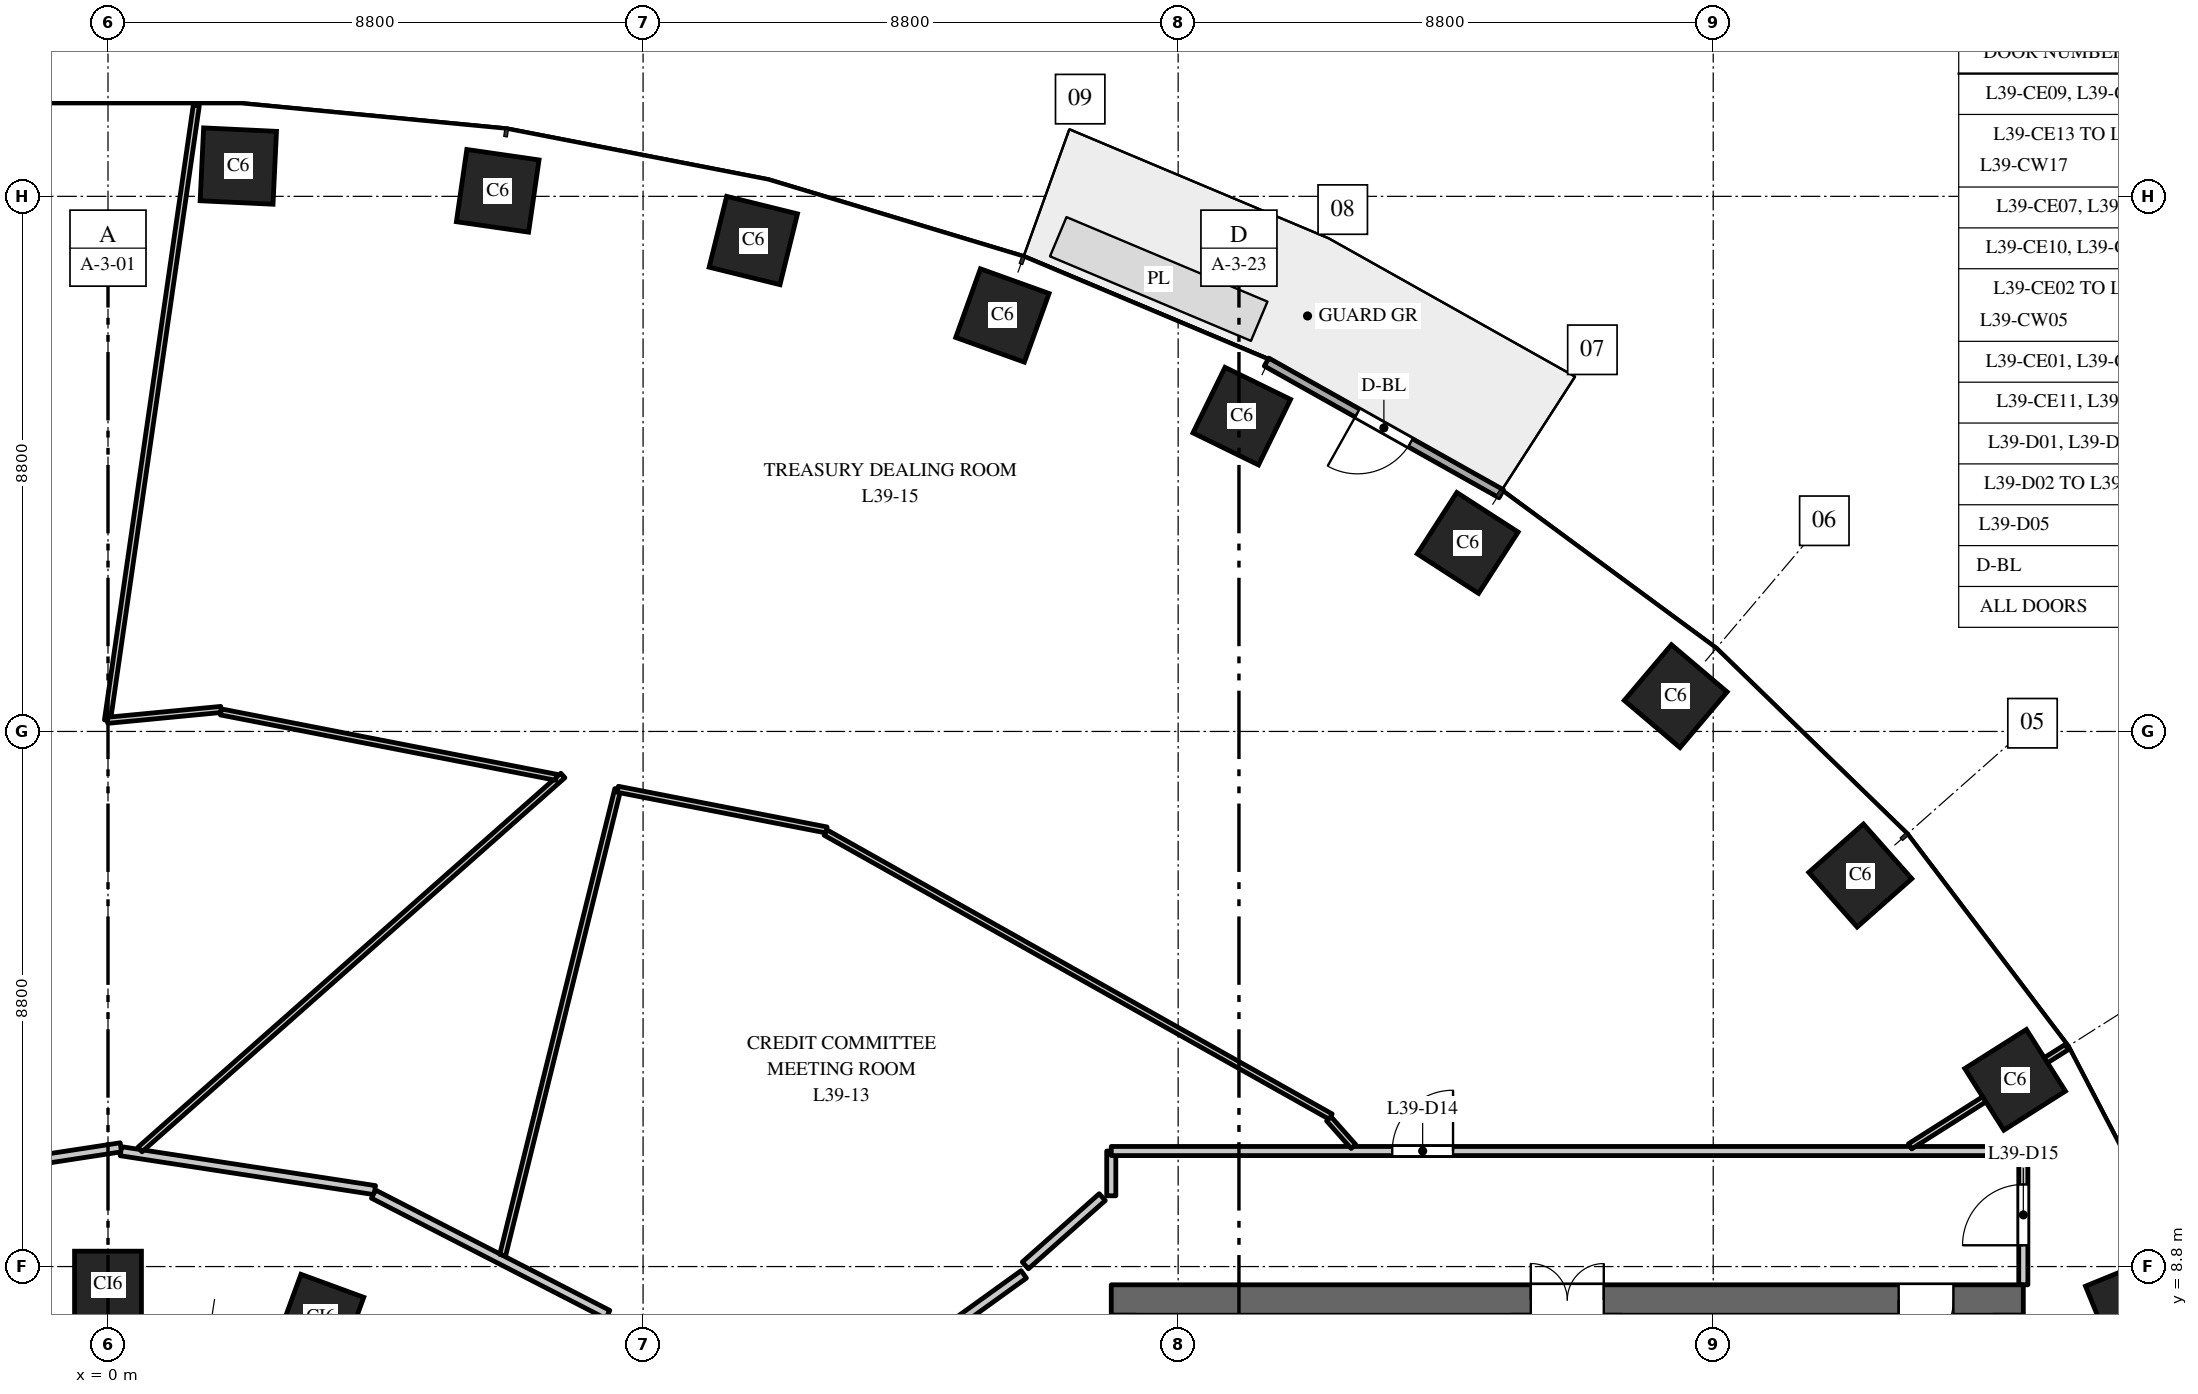
"""IFC4 building model, lengths in metres.
Left out: names, types, materials, properties, quantities, classifications, styles, units other than length and angle.
Written with IfcOpenShell. Run it as: python <this file> out.ifc"""

import sys

from ifc_helpers import new_model, si_unit, direction, frame, frame_2d, origin, origin_2d, place, context, subcontext, project, spatial, rectangle, extrude, element, fill, save


model = new_model("IFC4")
c1 = context("Model", 3, precision=1e-05, world=origin(), true_north=direction((0.0, 1.0)))
c2 = subcontext(c1, "Body", "Model", "MODEL_VIEW")
j1 = project(units=[si_unit("LENGTHUNIT", "METRE"), si_unit("PLANEANGLEUNIT", "RADIAN")], contexts=[c1])
p1 = place(None, origin())
s1 = spatial("IfcSite", under=j1, at=p1, CompositionType="ELEMENT")
p2 = place(p1, origin())
s2 = spatial("IfcBuilding", under=s1, at=p2, CompositionType="ELEMENT")
p3 = place(p2, frame((0.0, 0.0, 170.0)))
s3 = spatial("IfcBuildingStorey", under=s2, at=p3, CompositionType="ELEMENT", Elevation=170.0)
for number, where, z_axis, x_axis in (
    (1, (33.305, 8.149, 0.0), (0.0, 0.0, 1.0), (-0.379, 0.925, 0.0)),
    (2, (31.365, 11.871, 0.0), (0.0, 0.0, 1.0), (-0.535, 0.845, 0.0)),
    (3, (28.819, 15.23, 0.0), (0.0, 0.0, 1.0), (-0.663, 0.749, 0.0)),
    (4, (25.783, 18.18, 0.0), (0.0, 0.0, 1.0), (-0.763, 0.646, 0.0)),
    (5, (22.362, 20.7, 0.0), (0.0, 0.0, 1.0), (-0.84, 0.542, 0.0)),
    (6, (18.646, 22.785, 0.0), (0.0, 0.0, 1.0), (-0.898, 0.439, 0.0)),
    (7, (14.709, 24.441, 0.0), (0.0, 0.0, 1.0), (-0.941, 0.338, 0.0)),
    (8, (10.613, 25.674, 0.0), (0.0, 0.0, 1.0), (-0.971, 0.24, 0.0)),
    (9, (6.409, 26.491, 0.0), (0.0, 0.0, 1.0), (-0.99, 0.143, 0.0)),
    (10, (2.143, 26.898, 0.0), (0.0, 0.0, 1.0), (-0.999, 0.048, 0.0)),
):
    element("IfcColumn", number, at=place(p3, frame(where, z_axis=z_axis, x_axis=x_axis)), inside=s3, PredefinedType="COLUMN", context=c2, shape_type="SweptSolid", body=[
        extrude(rectangle(XDim=1.2, YDim=1.2, at=origin_2d()), origin(), (0.0, 0.0, 1.0), 4.0),
    ])
for number, where, z_axis, x_axis in (
    (11, (3.501, 7.967, 0.0), (0.0, 0.0, 1.0), (-0.939, 0.344, 0.0)),
    (12, (0.0, 8.503, 0.0), (0.0, 0.0, 1.0), (-1.0, 0.0, 0.0)),
):
    element("IfcColumn", number, at=place(p3, frame(where, z_axis=z_axis, x_axis=x_axis)), inside=s3, PredefinedType="COLUMN", context=c2, shape_type="SweptSolid", body=[
        extrude(rectangle(XDim=1.1, YDim=1.1, at=origin_2d()), origin(), (0.0, 0.0, 1.0), 4.0),
    ])
p4 = place(p3, frame((16.5, 8.25, 0.0), z_axis=(0.0, 0.0, 1.0), x_axis=(1.0, 0.0, 0.0)))
e13 = element("IfcWall", 13, at=p4, inside=s3, PredefinedType="SHEAR", context=c2, shape_type="SweptSolid", body=[
    extrude(rectangle(XDim=15.0, YDim=0.5, at=frame_2d((7.5, 0.0))), origin(), (0.0, 0.0, 1.0), 3.7),
])
p5 = place(p4, frame((6.9, 0.0, 0.0)))
e14 = element("IfcOpeningElement", 14, at=p5, cuts=e13, PredefinedType="OPENING", context=c2, shape_type="SweptSolid", body=[
    extrude(rectangle(XDim=1.2, YDim=2.1, at=frame_2d((0.6, 1.05))), frame((0.0, 0.26, 0.0), z_axis=(0.0, -1.0, 0.0), x_axis=(1.0, 0.0, 0.0)), (0.0, 0.0, 1.0), 0.52),
])
p6 = place(p4, frame((12.95, 0.0, 0.0)))
e15 = element("IfcOpeningElement", 15, at=p6, cuts=e13, PredefinedType="OPENING", context=c2, shape_type="SweptSolid", body=[
    extrude(rectangle(XDim=0.9, YDim=2.1, at=frame_2d((0.45, 1.05))), frame((0.0, 0.26, 0.0), z_axis=(0.0, -1.0, 0.0), x_axis=(1.0, 0.0, 0.0)), (0.0, 0.0, 1.0), 0.52),
])
p7 = place(p3, frame((22.913, 21.509, 0.0), z_axis=(0.0, 0.0, 1.0), x_axis=(-0.872046572975, 0.489422899509, 0.0)))
e16 = element("IfcWall", 16, at=p7, inside=s3, PredefinedType="STANDARD", context=c2, shape_type="SweptSolid", body=[
    extrude(rectangle(XDim=4.426, YDim=0.15, at=frame_2d((2.213, 0.0))), origin(), (0.0, 0.0, 1.0), 3.7),
])
p8 = place(p7, frame((1.713, 0.0, 0.0)))
e17 = element("IfcOpeningElement", 17, at=p8, cuts=e16, PredefinedType="OPENING", context=c2, shape_type="SweptSolid", body=[
    extrude(rectangle(XDim=1.0, YDim=2.4, at=frame_2d((0.5, 1.2))), frame((0.0, 0.085, 0.0), z_axis=(0.0, -1.0, 0.0), x_axis=(1.0, 0.0, 0.0)), (0.0, 0.0, 1.0), 0.17),
])
p9 = place(p3, frame((-3.964, 10.121, 0.0), z_axis=(0.0, 0.0, 1.0), x_axis=(0.988463044045, 0.151462241359, 0.0)))
e18 = element("IfcWall", 18, at=p9, inside=s3, PredefinedType="PARTITIONING", context=c2, shape_type="SweptSolid", body=[
    extrude(rectangle(XDim=4.225, YDim=0.15, at=frame_2d((2.112, 0.0))), origin(), (0.0, 0.0, 1.0), 2.85),
])
p10 = place(p3, frame((-0.009, 17.783, 0.0), z_axis=(0.0, 0.0, 1.0), x_axis=(0.143003679494, 0.989722156795, 0.0)))
e19 = element("IfcWall", 19, at=p10, inside=s3, PredefinedType="PARTITIONING", context=c2, shape_type="SweptSolid", body=[
    extrude(rectangle(XDim=10.216, YDim=0.1, at=frame_2d((5.108, 0.0))), origin(), (0.0, 0.0, 1.0), 2.9),
])
p11 = place(p3, frame((-0.009, 17.783, 0.0), z_axis=(0.0, 0.0, 1.0), x_axis=(0.99544210385, 0.095367803179, 0.0)))
e20 = element("IfcWall", 20, at=p11, inside=s3, PredefinedType="PARTITIONING", context=c2, shape_type="SweptSolid", body=[
    extrude(rectangle(XDim=1.876, YDim=0.1, at=frame_2d((0.938, 0.0))), origin(), (0.0, 0.0, 1.0), 3.7),
])
p12 = place(p3, frame((0.212, 10.697, 0.0), z_axis=(0.0, 0.0, 1.0), x_axis=(0.988454390794, -0.151518702874, 0.0)))
e21 = element("IfcWall", 21, at=p12, inside=s3, PredefinedType="PARTITIONING", context=c2, shape_type="SweptSolid", body=[
    extrude(rectangle(XDim=4.225, YDim=0.15, at=frame_2d((2.112, 0.0))), origin(), (0.0, 0.0, 1.0), 2.85),
])
p13 = place(p3, frame((0.526, 10.725, 0.0), z_axis=(0.0, 0.0, 1.0), x_axis=(0.749086896245, 0.662471751755, 0.0)))
e22 = element("IfcWall", 22, at=p13, inside=s3, PredefinedType="PARTITIONING", context=c2, shape_type="SweptSolid", body=[
    extrude(rectangle(XDim=9.285, YDim=0.1, at=frame_2d((4.642, 0.0))), origin(), (0.0, 0.0, 1.0), 2.85),
])
p14 = place(p3, frame((1.857, 17.921, 0.0), z_axis=(0.0, 0.0, 1.0), x_axis=(0.981529813142, -0.191309241579, 0.0)))
e23 = element("IfcWall", 23, at=p14, inside=s3, PredefinedType="PARTITIONING", context=c2, shape_type="SweptSolid", body=[
    extrude(rectangle(XDim=5.619, YDim=0.1, at=frame_2d((2.81, 0.0))), origin(), (0.0, 0.0, 1.0), 2.85),
])
p15 = place(p3, frame((4.367, 9.991, 0.0), z_axis=(0.0, 0.0, 1.0), x_axis=(0.889480321924, -0.456973475061, 0.0)))
e24 = element("IfcWall", 24, at=p15, inside=s3, PredefinedType="PARTITIONING", context=c2, shape_type="SweptSolid", body=[
    extrude(rectangle(XDim=4.331, YDim=0.15, at=frame_2d((2.165, 0.0))), origin(), (0.0, 0.0, 1.0), 2.85),
])
p16 = place(p3, frame((6.491, 8.988, 0.0), z_axis=(0.0, 0.0, 1.0), x_axis=(0.239892267022, 0.970799515978, 0.0)))
e25 = element("IfcWall", 25, at=p16, inside=s3, PredefinedType="PARTITIONING", context=c2, shape_type="SweptSolid", body=[
    extrude(rectangle(XDim=7.891, YDim=0.1, at=frame_2d((3.946, 0.0))), origin(), (0.0, 0.0, 1.0), 2.85),
])
p17 = place(p3, frame((8.384, 16.649, 0.0), z_axis=(0.0, 0.0, 1.0), x_axis=(0.981537925875, -0.191267613747, 0.0)))
e26 = element("IfcWall", 26, at=p17, inside=s3, PredefinedType="PARTITIONING", context=c2, shape_type="SweptSolid", body=[
    extrude(rectangle(XDim=3.497, YDim=0.1, at=frame_2d((1.749, 0.0))), origin(), (0.0, 0.0, 1.0), 2.85),
])
p18 = place(p3, frame((10.439, 5.345, 0.0), z_axis=(0.0, 0.0, 1.0), x_axis=(0.811697765448, 0.584077681106, 0.0)))
e27 = element("IfcWall", 27, at=p18, inside=s3, PredefinedType="PARTITIONING", context=c2, shape_type="SweptSolid", body=[
    extrude(rectangle(XDim=5.694, YDim=0.15, at=frame_2d((2.847, 0.0))), origin(), (0.0, 0.0, 1.0), 2.75),
])
p19 = place(p18, frame((0.544, 0.0, 0.0)))
e28 = element("IfcOpeningElement", 28, at=p19, cuts=e27, PredefinedType="OPENING", context=c2, shape_type="SweptSolid", body=[
    extrude(rectangle(XDim=1.0, YDim=2.1, at=frame_2d((0.5, 1.05))), frame((0.0, 0.085, 0.0), z_axis=(0.0, -1.0, 0.0), x_axis=(1.0, 0.0, 0.0)), (0.0, 0.0, 1.0), 0.17),
])
p20 = place(p3, frame((11.802, 15.937, 0.0), z_axis=(0.0, 0.0, 1.0), x_axis=(0.871652836429, -0.490123793286, 0.0)))
e29 = element("IfcWall", 29, at=p20, inside=s3, PredefinedType="PARTITIONING", context=c2, shape_type="SweptSolid", body=[
    extrude(rectangle(XDim=9.53, YDim=0.1, at=frame_2d((4.765, 0.0))), origin(), (0.0, 0.0, 1.0), 3.7),
])
p21 = place(p3, frame((16.5, 9.964, 0.0), z_axis=(0.0, 0.0, 1.0), x_axis=(0.0, 1.0, 0.0)))
e30 = element("IfcWall", 30, at=p21, inside=s3, PredefinedType="PARTITIONING", context=c2, shape_type="SweptSolid", body=[
    extrude(rectangle(XDim=0.736, YDim=0.15, at=frame_2d((0.368, 0.0))), origin(), (0.0, 0.0, 1.0), 3.7),
])
p22 = place(p3, frame((16.5, 10.7, 0.0), z_axis=(0.0, 0.0, 1.0), x_axis=(1.0, 0.0, 0.0)))
e31 = element("IfcWall", 31, at=p22, inside=s3, PredefinedType="PARTITIONING", context=c2, shape_type="SweptSolid", body=[
    extrude(rectangle(XDim=15.0, YDim=0.15, at=frame_2d((7.5, 0.0))), origin(), (0.0, 0.0, 1.0), 2.75),
])
p23 = place(p22, frame((4.621, 0.0, 0.0)))
e32 = element("IfcOpeningElement", 32, at=p23, cuts=e31, PredefinedType="OPENING", context=c2, shape_type="SweptSolid", body=[
    extrude(rectangle(XDim=1.0, YDim=2.1, at=frame_2d((0.5, 1.05))), frame((0.0, 0.085, 0.0), z_axis=(0.0, -1.0, 0.0), x_axis=(1.0, 0.0, 0.0)), (0.0, 0.0, 1.0), 0.17),
])
p24 = place(p3, frame((20.079, 11.229, 0.0), z_axis=(0.0, 0.0, 1.0), x_axis=(0.663614598559, -0.748074638375, 0.0)))
e33 = element("IfcWall", 33, at=p24, inside=s3, PredefinedType="PARTITIONING", context=c2, shape_type="SweptSolid", body=[
    extrude(rectangle(XDim=0.607, YDim=0.1, at=frame_2d((0.303, 0.0))), origin(), (0.0, 0.0, 1.0), 2.75),
])
p25 = place(p3, frame((29.637, 10.777, 0.0), z_axis=(0.0, 0.0, 1.0), x_axis=(0.844810627195, 0.535065420467, 0.0)))
e34 = element("IfcWall", 34, at=p25, inside=s3, PredefinedType="PARTITIONING", context=c2, shape_type="SweptSolid", body=[
    extrude(rectangle(XDim=3.048, YDim=0.1, at=frame_2d((1.524, 0.0))), origin(), (0.0, 0.0, 1.0), 2.9),
])
p26 = place(p3, frame((31.5, 8.5, 0.0), z_axis=(0.0, 0.0, 1.0), x_axis=(0.0, 1.0, 0.0)))
e35 = element("IfcWall", 35, at=p26, inside=s3, PredefinedType="PARTITIONING", context=c2, shape_type="SweptSolid", body=[
    extrude(rectangle(XDim=2.2, YDim=0.15, at=frame_2d((1.1, 0.0))), origin(), (0.0, 0.0, 1.0), 2.9),
])
p27 = place(p26, frame((0.65, 0.0, 0.0)))
e36 = element("IfcOpeningElement", 36, at=p27, cuts=e35, PredefinedType="OPENING", context=c2, shape_type="SweptSolid", body=[
    extrude(rectangle(XDim=1.0, YDim=2.1, at=frame_2d((0.5, 1.05))), frame((0.0, 0.085, 0.0), z_axis=(0.0, -1.0, 0.0), x_axis=(1.0, 0.0, 0.0)), (0.0, 0.0, 1.0), 0.17),
])
p28 = place(p3, frame((15.087, 8.819, 0.0), z_axis=(0.0, 0.0, 1.0), x_axis=(0.747926695066, 0.663781333579, 0.0)))
e37 = element("IfcWall", 37, at=p28, inside=s3, PredefinedType="PARTITIONING", context=c2, shape_type="SweptSolid", body=[
    extrude(rectangle(XDim=1.691, YDim=0.15, at=frame_2d((0.846, 0.0))), origin(), (0.0, 0.0, 1.0), 3.7),
])
p29 = place(p5, origin())
e38 = element("IfcDoor", 38, at=p29, inside=s3, OperationType="DOUBLE_DOOR_DOUBLE_SWING", PredefinedType="DOOR", context=c2, shape_type="SweptSolid", body=[
    extrude(rectangle(XDim=1.2, YDim=2.1, at=frame_2d((0.6, 1.05))), frame((0.0, 0.025, 0.0), z_axis=(0.0, -1.0, 0.0), x_axis=(1.0, 0.0, 0.0)), (0.0, 0.0, 1.0), 0.05),
])
fill(e14, e38)
p30 = place(p6, origin())
e39 = element("IfcDoor", 39, at=p30, inside=s3, OperationType="SINGLE_SWING_LEFT", PredefinedType="DOOR", context=c2, shape_type="SweptSolid", body=[
    extrude(rectangle(XDim=0.9, YDim=2.1, at=frame_2d((0.45, 1.05))), frame((0.0, 0.025, 0.0), z_axis=(0.0, -1.0, 0.0), x_axis=(1.0, 0.0, 0.0)), (0.0, 0.0, 1.0), 0.05),
])
fill(e15, e39)
p31 = place(p8, origin())
e40 = element("IfcDoor", 40, at=p31, inside=s3, OperationType="SINGLE_SWING_RIGHT", PredefinedType="DOOR", context=c2, shape_type="SweptSolid", body=[
    extrude(rectangle(XDim=1.0, YDim=2.4, at=frame_2d((0.5, 1.2))), frame((0.0, 0.025, 0.0), z_axis=(0.0, -1.0, 0.0), x_axis=(1.0, 0.0, 0.0)), (0.0, 0.0, 1.0), 0.05),
])
fill(e17, e40)
p32 = place(p23, origin())
e41 = element("IfcDoor", 41, at=p32, inside=s3, OperationType="SINGLE_SWING_RIGHT", PredefinedType="DOOR", context=c2, shape_type="SweptSolid", body=[
    extrude(rectangle(XDim=1.0, YDim=2.1, at=frame_2d((0.5, 1.05))), frame((0.0, 0.025, 0.0), z_axis=(0.0, -1.0, 0.0), x_axis=(1.0, 0.0, 0.0)), (0.0, 0.0, 1.0), 0.05),
])
fill(e32, e41)
p33 = place(p27, origin())
e42 = element("IfcDoor", 42, at=p33, inside=s3, OperationType="SINGLE_SWING_LEFT", PredefinedType="DOOR", context=c2, shape_type="SweptSolid", body=[
    extrude(rectangle(XDim=1.0, YDim=2.1, at=frame_2d((0.5, 1.05))), frame((0.0, 0.025, 0.0), z_axis=(0.0, -1.0, 0.0), x_axis=(1.0, 0.0, 0.0)), (0.0, 0.0, 1.0), 0.05),
])
fill(e36, e42)
save(model, sys.argv[1])
